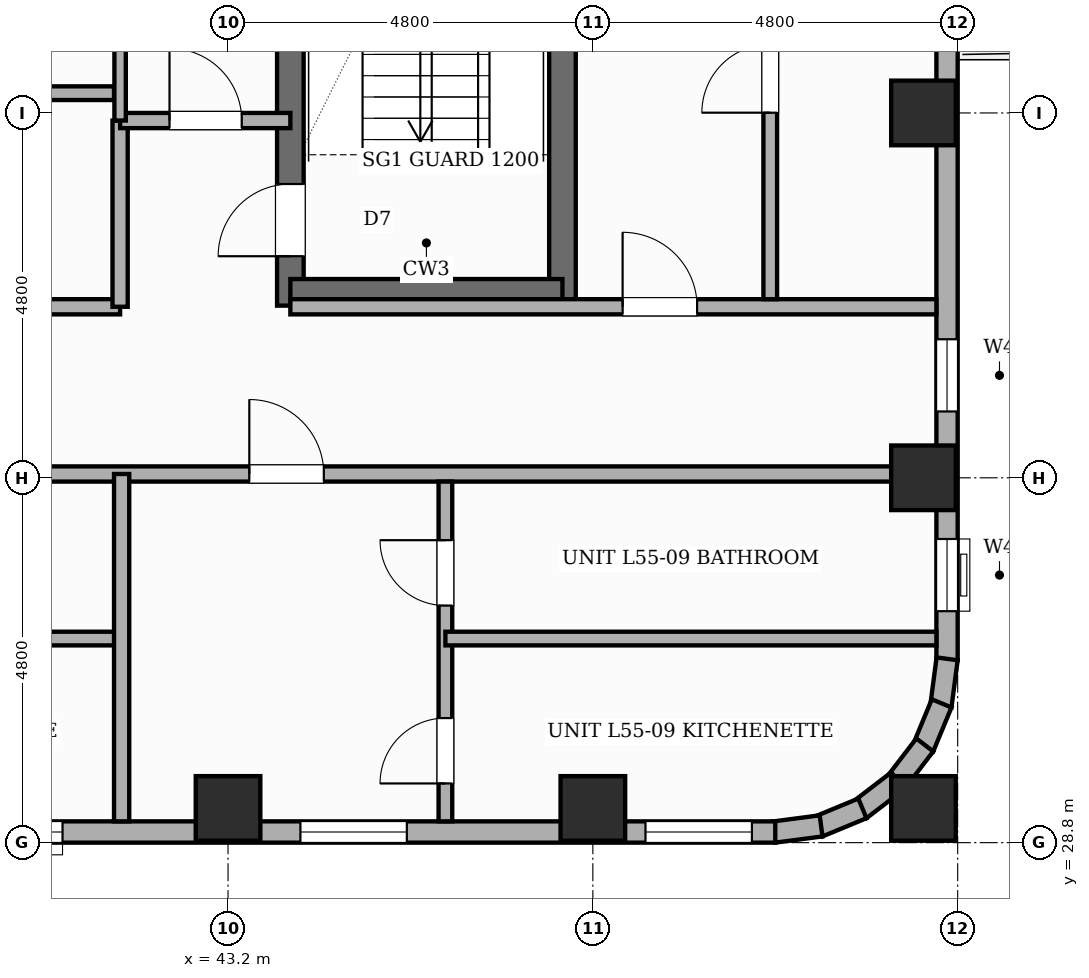
"""IFC4 building model, lengths in metres.
Left out: names, types, materials, properties, quantities, classifications, styles, units other than length and angle.
Written with IfcOpenShell. Run it as: python <this file> out.ifc"""

import sys

from ifc_helpers import new_model, si_unit, direction, frame, frame_2d, origin, origin_2d, place, context, subcontext, project, spatial, rectangle, extrude, element, fill, save


model = new_model("IFC4")
c1 = context("Model", 3, precision=1e-05, world=origin(), true_north=direction((0.0, 1.0)))
c2 = subcontext(c1, "Body", "Model", "MODEL_VIEW")
j1 = project(units=[si_unit("LENGTHUNIT", "METRE"), si_unit("PLANEANGLEUNIT", "RADIAN")], contexts=[c1])
p1 = place(None, origin())
s1 = spatial("IfcSite", under=j1, at=p1, CompositionType="ELEMENT")
p2 = place(p1, origin())
s2 = spatial("IfcBuilding", under=s1, at=p2, CompositionType="ELEMENT")
p3 = place(p2, frame((0.0, 0.0, 211.0)))
s3 = spatial("IfcBuildingStorey", under=s2, at=p3, CompositionType="ELEMENT", Elevation=211.0)
p4 = place(p3, frame((44.02, 35.865, 0.0), z_axis=(0.0, 0.0, 1.0), x_axis=(0.0, 1.0, 0.0)))
e1 = element("IfcWall", 1, at=p4, inside=s3, PredefinedType="SHEAR", context=c2, shape_type="SweptSolid", body=[
    extrude(rectangle(XDim=8.97, YDim=0.35, at=frame_2d((4.485, 0.0))), origin(), (0.0, 0.0, 1.0), 3.6),
])
p5 = place(p4, frame((0.65, 0.0, 0.0)))
e2 = element("IfcOpeningElement", 2, at=p5, cuts=e1, PredefinedType="OPENING", context=c2, shape_type="SweptSolid", body=[
    extrude(rectangle(XDim=0.95, YDim=2.1, at=frame_2d((0.475, 1.05))), frame((0.0, 0.185, 0.0), z_axis=(0.0, -1.0, 0.0), x_axis=(1.0, 0.0, 0.0)), (0.0, 0.0, 1.0), 0.37),
])
p6 = place(p3, frame((47.6, 35.865, 0.0), z_axis=(0.0, 0.0, 1.0), x_axis=(0.0, 1.0, 0.0)))
e3 = element("IfcWall", 3, at=p6, inside=s3, PredefinedType="SHEAR", context=c2, shape_type="SweptSolid", body=[
    extrude(rectangle(XDim=8.97, YDim=0.35, at=frame_2d((4.485, 0.0))), origin(), (0.0, 0.0, 1.0), 3.6),
])
p7 = place(p3, frame((44.02, 36.04, 0.0), z_axis=(0.0, 0.0, 1.0), x_axis=(1.0, 0.0, 0.0)))
e4 = element("IfcWall", 4, at=p7, inside=s3, PredefinedType="SHEAR", context=c2, shape_type="SweptSolid", body=[
    extrude(rectangle(XDim=3.58, YDim=0.35, at=frame_2d((1.79, 0.0))), origin(), (0.0, 0.0, 1.0), 3.6),
])
for number, where, z_axis, x_axis in (
    (5, (43.2, 29.25, 0.0), (0.0, 0.0, 1.0), (1.0, 0.0, 0.0)),
    (6, (48.0, 29.25, 0.0), (0.0, 0.0, 1.0), (1.0, 0.0, 0.0)),
    (7, (52.35, 29.25, 0.0), (0.0, 0.0, 1.0), (1.0, 0.0, 0.0)),
    (8, (52.35, 33.6, 0.0), (0.0, 0.0, 1.0), (1.0, 0.0, 0.0)),
    (9, (52.35, 38.4, 0.0), (0.0, 0.0, 1.0), (1.0, 0.0, 0.0)),
):
    element("IfcColumn", number, at=place(p3, frame(where, z_axis=z_axis, x_axis=x_axis)), inside=s3, PredefinedType="COLUMN", context=c2, shape_type="SweptSolid", body=[
        extrude(rectangle(XDim=0.85, YDim=0.85, at=origin_2d()), origin(), (0.0, 0.0, 1.0), 3.6),
    ])
p8 = place(p3, frame((52.66, 45.6, 0.0), z_axis=(0.0, 0.0, 1.0), x_axis=(0.0, -1.0, 0.0)))
e10 = element("IfcWall", 10, at=p8, inside=s3, PredefinedType="STANDARD", context=c2, shape_type="SweptSolid", body=[
    extrude(rectangle(XDim=14.4, YDim=0.28, at=frame_2d((7.2, 0.0))), origin(), (0.0, 0.0, 1.0), 2.66),
])
p9 = place(p8, frame((4.25, 0.0, 0.0)))
e11 = element("IfcOpeningElement", 11, at=p9, cuts=e10, PredefinedType="OPENING", context=c2, shape_type="SweptSolid", body=[
    extrude(rectangle(XDim=1.1, YDim=2.15, at=frame_2d((0.55, 1.075))), frame((0.0, 0.15, 0.0), z_axis=(0.0, -1.0, 0.0), x_axis=(1.0, 0.0, 0.0)), (0.0, 0.0, 1.0), 0.3),
])
p10 = place(p8, frame((10.177, 0.0, 0.45)))
e12 = element("IfcOpeningElement", 12, at=p10, cuts=e10, PredefinedType="OPENING", context=c2, shape_type="SweptSolid", body=[
    extrude(rectangle(XDim=0.95, YDim=1.8, at=frame_2d((0.475, 0.9))), frame((0.0, 0.15, 0.0), z_axis=(0.0, -1.0, 0.0), x_axis=(1.0, 0.0, 0.0)), (0.0, 0.0, 1.0), 0.3),
])
p11 = place(p8, frame((12.805, 0.0, 0.45)))
e13 = element("IfcOpeningElement", 13, at=p11, cuts=e10, PredefinedType="OPENING", context=c2, shape_type="SweptSolid", body=[
    extrude(rectangle(XDim=0.95, YDim=1.8, at=frame_2d((0.475, 0.9))), frame((0.0, 0.15, 0.0), z_axis=(0.0, -1.0, 0.0), x_axis=(1.0, 0.0, 0.0)), (0.0, 0.0, 1.0), 0.3),
])
p12 = place(p8, frame((0.308, 0.0, 0.65)))
e14 = element("IfcOpeningElement", 14, at=p12, cuts=e10, PredefinedType="OPENING", context=c2, shape_type="SweptSolid", body=[
    extrude(rectangle(XDim=1.4, YDim=1.1, at=frame_2d((0.7, 0.55))), frame((0.0, 0.15, 0.0), z_axis=(0.0, -1.0, 0.0), x_axis=(1.0, 0.0, 0.0)), (0.0, 0.0, 1.0), 0.3),
])
p13 = place(p8, frame((3.299, 0.0, 0.45)))
e15 = element("IfcOpeningElement", 15, at=p13, cuts=e10, PredefinedType="OPENING", context=c2, shape_type="SweptSolid", body=[
    extrude(rectangle(XDim=0.6, YDim=1.8, at=frame_2d((0.3, 0.9))), frame((0.0, 0.15, 0.0), z_axis=(0.0, -1.0, 0.0), x_axis=(1.0, 0.0, 0.0)), (0.0, 0.0, 1.0), 0.3),
])
p14 = place(p3, frame((52.661, 31.218, 0.0), z_axis=(0.0, 0.0, 1.0), x_axis=(-0.130555323746, -0.9914410257, 0.0)))
e16 = element("IfcWall", 16, at=p14, inside=s3, PredefinedType="STANDARD", context=c2, shape_type="SweptSolid", body=[
    extrude(rectangle(XDim=0.626, YDim=0.28, at=frame_2d((0.313, 0.0))), origin(), (0.0, 0.0, 1.0), 2.66),
])
p15 = place(p3, frame((52.589, 30.632, 0.0), z_axis=(0.0, 0.0, 1.0), x_axis=(-0.382787856107, -0.923836271867, 0.0)))
e17 = element("IfcWall", 17, at=p15, inside=s3, PredefinedType="STANDARD", context=c2, shape_type="SweptSolid", body=[
    extrude(rectangle(XDim=0.626, YDim=0.28, at=frame_2d((0.313, 0.0))), origin(), (0.0, 0.0, 1.0), 2.66),
])
for number, where, z_axis, x_axis in (
    (18, (52.367, 30.085, 0.0), (0.0, 0.0, 1.0), (-0.609, -0.793, 0.0)),
    (19, (52.012, 29.614, 0.0), (0.0, 0.0, 1.0), (-0.793, -0.609, 0.0)),
    (20, (51.546, 29.251, 0.0), (0.0, 0.0, 1.0), (-0.924, -0.383, 0.0)),
):
    element("IfcWall", number, at=place(p3, frame(where, z_axis=z_axis, x_axis=x_axis)), inside=s3, PredefinedType="STANDARD", context=c2, shape_type="SweptSolid", body=[
        extrude(rectangle(XDim=0.626, YDim=0.28, at=frame_2d((0.313, 0.0))), origin(), (0.0, 0.0, 1.0), 2.66),
    ])
p16 = place(p3, frame((51.003, 29.021, 0.0), z_axis=(0.0, 0.0, 1.0), x_axis=(-0.991447664465, -0.130504898859, 0.0)))
e21 = element("IfcWall", 21, at=p16, inside=s3, PredefinedType="STANDARD", context=c2, shape_type="SweptSolid", body=[
    extrude(rectangle(XDim=0.627, YDim=0.28, at=frame_2d((0.313, 0.0))), origin(), (0.0, 0.0, 1.0), 2.66),
])
p17 = place(p3, frame((50.4, 28.94, 0.0), z_axis=(0.0, 0.0, 1.0), x_axis=(-1.0, 0.0, 0.0)))
e22 = element("IfcWall", 22, at=p17, inside=s3, PredefinedType="STANDARD", context=c2, shape_type="SweptSolid", body=[
    extrude(rectangle(XDim=24.0, YDim=0.28, at=frame_2d((12.0, 0.0))), origin(), (0.0, 0.0, 1.0), 2.66),
])
p18 = place(p17, frame((19.177, 0.0, 0.65)))
e23 = element("IfcOpeningElement", 23, at=p18, cuts=e22, PredefinedType="OPENING", context=c2, shape_type="SweptSolid", body=[
    extrude(rectangle(XDim=1.4, YDim=1.1, at=frame_2d((0.7, 0.55))), frame((0.0, 0.15, 0.0), z_axis=(0.0, -1.0, 0.0), x_axis=(1.0, 0.0, 0.0)), (0.0, 0.0, 1.0), 0.3),
])
p19 = place(p17, frame((14.481, 0.0, 0.65)))
e24 = element("IfcOpeningElement", 24, at=p19, cuts=e22, PredefinedType="OPENING", context=c2, shape_type="SweptSolid", body=[
    extrude(rectangle(XDim=1.4, YDim=1.1, at=frame_2d((0.7, 0.55))), frame((0.0, 0.15, 0.0), z_axis=(0.0, -1.0, 0.0), x_axis=(1.0, 0.0, 0.0)), (0.0, 0.0, 1.0), 0.3),
])
p20 = place(p17, frame((4.847, 0.0, 0.65)))
e25 = element("IfcOpeningElement", 25, at=p20, cuts=e22, PredefinedType="OPENING", context=c2, shape_type="SweptSolid", body=[
    extrude(rectangle(XDim=1.4, YDim=1.1, at=frame_2d((0.7, 0.55))), frame((0.0, 0.15, 0.0), z_axis=(0.0, -1.0, 0.0), x_axis=(1.0, 0.0, 0.0)), (0.0, 0.0, 1.0), 0.3),
])
p21 = place(p17, frame((9.377, 0.0, 0.65)))
e26 = element("IfcOpeningElement", 26, at=p21, cuts=e22, PredefinedType="OPENING", context=c2, shape_type="SweptSolid", body=[
    extrude(rectangle(XDim=1.4, YDim=1.1, at=frame_2d((0.7, 0.55))), frame((0.0, 0.15, 0.0), z_axis=(0.0, -1.0, 0.0), x_axis=(1.0, 0.0, 0.0)), (0.0, 0.0, 1.0), 0.3),
])
p22 = place(p17, frame((0.308, 0.0, 0.65)))
e27 = element("IfcOpeningElement", 27, at=p22, cuts=e22, PredefinedType="OPENING", context=c2, shape_type="SweptSolid", body=[
    extrude(rectangle(XDim=1.4, YDim=1.1, at=frame_2d((0.7, 0.55))), frame((0.0, 0.15, 0.0), z_axis=(0.0, -1.0, 0.0), x_axis=(1.0, 0.0, 0.0)), (0.0, 0.0, 1.0), 0.3),
])
p23 = place(p3, frame((22.75, 33.65, 0.0), z_axis=(0.0, 0.0, 1.0), x_axis=(1.0, 0.0, 0.0)))
e28 = element("IfcWall", 28, at=p23, inside=s3, PredefinedType="PARTITIONING", context=c2, shape_type="SweptSolid", body=[
    extrude(rectangle(XDim=29.77, YDim=0.2, at=frame_2d((14.885, 0.0))), origin(), (0.0, 0.0, 1.0), 3.38),
])
p24 = place(p23, frame((5.995, 0.0, 0.0)))
e29 = element("IfcOpeningElement", 29, at=p24, cuts=e28, PredefinedType="OPENING", context=c2, shape_type="SweptSolid", body=[
    extrude(rectangle(XDim=0.98, YDim=2.18, at=frame_2d((0.49, 1.09))), frame((0.0, 0.11, 0.0), z_axis=(0.0, -1.0, 0.0), x_axis=(1.0, 0.0, 0.0)), (0.0, 0.0, 1.0), 0.22),
])
p25 = place(p23, frame((10.896, 0.0, 0.0)))
e30 = element("IfcOpeningElement", 30, at=p25, cuts=e28, PredefinedType="OPENING", context=c2, shape_type="SweptSolid", body=[
    extrude(rectangle(XDim=0.98, YDim=2.18, at=frame_2d((0.49, 1.09))), frame((0.0, 0.11, 0.0), z_axis=(0.0, -1.0, 0.0), x_axis=(1.0, 0.0, 0.0)), (0.0, 0.0, 1.0), 0.22),
])
p26 = place(p23, frame((20.73, 0.0, 0.0)))
e31 = element("IfcOpeningElement", 31, at=p26, cuts=e28, PredefinedType="OPENING", context=c2, shape_type="SweptSolid", body=[
    extrude(rectangle(XDim=0.98, YDim=2.18, at=frame_2d((0.49, 1.09))), frame((0.0, 0.11, 0.0), z_axis=(0.0, -1.0, 0.0), x_axis=(1.0, 0.0, 0.0)), (0.0, 0.0, 1.0), 0.22),
])
p27 = place(p3, frame((27.35, 35.85, 0.0), z_axis=(0.0, 0.0, 1.0), x_axis=(1.0, 0.0, 0.0)))
e32 = element("IfcWall", 32, at=p27, inside=s3, PredefinedType="PARTITIONING", context=c2, shape_type="SweptSolid", body=[
    extrude(rectangle(XDim=14.43, YDim=0.2, at=frame_2d((7.215, 0.0))), origin(), (0.0, 0.0, 1.0), 3.38),
])
p28 = place(p27, frame((4.803, 0.0, 0.0)))
e33 = element("IfcOpeningElement", 33, at=p28, cuts=e32, PredefinedType="OPENING", context=c2, shape_type="SweptSolid", body=[
    extrude(rectangle(XDim=0.98, YDim=2.18, at=frame_2d((0.49, 1.09))), frame((0.0, 0.11, 0.0), z_axis=(0.0, -1.0, 0.0), x_axis=(1.0, 0.0, 0.0)), (0.0, 0.0, 1.0), 0.22),
])
p29 = place(p3, frame((44.02, 35.85, 0.0), z_axis=(0.0, 0.0, 1.0), x_axis=(1.0, 0.0, 0.0)))
e34 = element("IfcWall", 34, at=p29, inside=s3, PredefinedType="PARTITIONING", context=c2, shape_type="SweptSolid", body=[
    extrude(rectangle(XDim=8.5, YDim=0.2, at=frame_2d((4.25, 0.0))), origin(), (0.0, 0.0, 1.0), 3.38),
])
p30 = place(p29, frame((4.372, 0.0, 0.0)))
e35 = element("IfcOpeningElement", 35, at=p30, cuts=e34, PredefinedType="OPENING", context=c2, shape_type="SweptSolid", body=[
    extrude(rectangle(XDim=0.98, YDim=2.18, at=frame_2d((0.49, 1.09))), frame((0.0, 0.11, 0.0), z_axis=(0.0, -1.0, 0.0), x_axis=(1.0, 0.0, 0.0)), (0.0, 0.0, 1.0), 0.22),
])
p31 = place(p3, frame((41.78, 35.85, 0.0), z_axis=(0.0, 0.0, 1.0), x_axis=(0.0, 1.0, 0.0)))
e36 = element("IfcWall", 36, at=p31, inside=s3, PredefinedType="PARTITIONING", context=c2, shape_type="SweptSolid", body=[
    extrude(rectangle(XDim=2.45, YDim=0.2, at=frame_2d((1.225, 0.0))), origin(), (0.0, 0.0, 1.0), 3.38),
])
p32 = place(p3, frame((41.78, 38.3, 0.0), z_axis=(0.0, 0.0, 1.0), x_axis=(1.0, 0.0, 0.0)))
e37 = element("IfcWall", 37, at=p32, inside=s3, PredefinedType="PARTITIONING", context=c2, shape_type="SweptSolid", body=[
    extrude(rectangle(XDim=2.24, YDim=0.2, at=frame_2d((1.12, 0.0))), origin(), (0.0, 0.0, 1.0), 3.38),
])
p33 = place(p32, frame((0.65, 0.0, 0.0)))
e38 = element("IfcOpeningElement", 38, at=p33, cuts=e37, PredefinedType="OPENING", context=c2, shape_type="SweptSolid", body=[
    extrude(rectangle(XDim=0.95, YDim=2.15, at=frame_2d((0.475, 1.075))), frame((0.0, 0.11, 0.0), z_axis=(0.0, -1.0, 0.0), x_axis=(1.0, 0.0, 0.0)), (0.0, 0.0, 1.0), 0.22),
])
p34 = place(p3, frame((36.392, 31.485, 0.0), z_axis=(0.0, 0.0, 1.0), x_axis=(1.0, 0.0, 0.0)))
e39 = element("IfcWall", 39, at=p34, inside=s3, PredefinedType="PLUMBINGWALL", context=c2, shape_type="SweptSolid", body=[
    extrude(rectangle(XDim=5.408, YDim=0.18, at=frame_2d((2.704, 0.0))), origin(), (0.0, 0.0, 1.0), 3.38),
])
p35 = place(p3, frame((41.8, 29.08, 0.0), z_axis=(0.0, 0.0, 1.0), x_axis=(0.0, 1.0, 0.0)))
e40 = element("IfcWall", 40, at=p35, inside=s3, PredefinedType="SOLIDWALL", context=c2, shape_type="SweptSolid", body=[
    extrude(rectangle(XDim=4.57, YDim=0.2, at=frame_2d((2.285, 0.0))), origin(), (0.0, 0.0, 1.0), 3.38),
])
p36 = place(p3, frame((46.06, 29.08, 0.0), z_axis=(0.0, 0.0, 1.0), x_axis=(0.0, 1.0, 0.0)))
e41 = element("IfcWall", 41, at=p36, inside=s3, PredefinedType="PLUMBINGWALL", context=c2, shape_type="SweptSolid", body=[
    extrude(rectangle(XDim=4.47, YDim=0.18, at=frame_2d((2.235, 0.0))), origin(), (0.0, 0.0, 1.0), 3.38),
])
p37 = place(p36, frame((0.499, 0.0, 0.0)))
e42 = element("IfcOpeningElement", 42, at=p37, cuts=e41, PredefinedType="OPENING", context=c2, shape_type="SweptSolid", body=[
    extrude(rectangle(XDim=0.86, YDim=2.1, at=frame_2d((0.43, 1.05))), frame((0.0, 0.1, 0.0), z_axis=(0.0, -1.0, 0.0), x_axis=(1.0, 0.0, 0.0)), (0.0, 0.0, 1.0), 0.2),
])
p38 = place(p36, frame((2.839, 0.0, 0.0)))
e43 = element("IfcOpeningElement", 43, at=p38, cuts=e41, PredefinedType="OPENING", context=c2, shape_type="SweptSolid", body=[
    extrude(rectangle(XDim=0.86, YDim=2.1, at=frame_2d((0.43, 1.05))), frame((0.0, 0.1, 0.0), z_axis=(0.0, -1.0, 0.0), x_axis=(1.0, 0.0, 0.0)), (0.0, 0.0, 1.0), 0.2),
])
p39 = place(p3, frame((46.06, 31.485, 0.0), z_axis=(0.0, 0.0, 1.0), x_axis=(1.0, 0.0, 0.0)))
e44 = element("IfcWall", 44, at=p39, inside=s3, PredefinedType="PLUMBINGWALL", context=c2, shape_type="SweptSolid", body=[
    extrude(rectangle(XDim=6.46, YDim=0.18, at=frame_2d((3.23, 0.0))), origin(), (0.0, 0.0, 1.0), 3.38),
])
p40 = place(p3, frame((35.577, 38.66, 0.0), z_axis=(0.0, 0.0, 1.0), x_axis=(1.0, 0.0, 0.0)))
e45 = element("IfcWall", 45, at=p40, inside=s3, PredefinedType="PLUMBINGWALL", context=c2, shape_type="SweptSolid", body=[
    extrude(rectangle(XDim=6.123, YDim=0.18, at=frame_2d((3.062, 0.0))), origin(), (0.0, 0.0, 1.0), 3.38),
])
p41 = place(p3, frame((41.78, 38.3, 0.0), z_axis=(0.0, 0.0, 1.0), x_axis=(0.0, 1.0, 0.0)))
e46 = element("IfcWall", 46, at=p41, inside=s3, PredefinedType="PARTITIONING", context=c2, shape_type="SweptSolid", body=[
    extrude(rectangle(XDim=9.42, YDim=0.15, at=frame_2d((4.71, 0.0))), origin(), (0.0, 0.0, 1.0), 3.38),
])
p42 = place(p3, frame((50.334, 35.95, 0.0), z_axis=(0.0, 0.0, 1.0), x_axis=(0.0, 1.0, 0.0)))
e47 = element("IfcWall", 47, at=p42, inside=s3, PredefinedType="PLUMBINGWALL", context=c2, shape_type="SweptSolid", body=[
    extrude(rectangle(XDim=11.77, YDim=0.18, at=frame_2d((5.885, 0.0))), origin(), (0.0, 0.0, 1.0), 3.38),
])
p43 = place(p42, frame((2.453, 0.0, 0.0)))
e48 = element("IfcOpeningElement", 48, at=p43, cuts=e47, PredefinedType="OPENING", context=c2, shape_type="SweptSolid", body=[
    extrude(rectangle(XDim=0.9, YDim=2.15, at=frame_2d((0.45, 1.075))), frame((0.0, 0.1, 0.0), z_axis=(0.0, -1.0, 0.0), x_axis=(1.0, 0.0, 0.0)), (0.0, 0.0, 1.0), 0.2),
])
p44 = place(p42, frame((8.487, 0.0, 0.0)))
e49 = element("IfcOpeningElement", 49, at=p44, cuts=e47, PredefinedType="OPENING", context=c2, shape_type="SweptSolid", body=[
    extrude(rectangle(XDim=0.86, YDim=2.1, at=frame_2d((0.43, 1.05))), frame((0.0, 0.1, 0.0), z_axis=(0.0, -1.0, 0.0), x_axis=(1.0, 0.0, 0.0)), (0.0, 0.0, 1.0), 0.2),
])
p45 = place(p10, origin())
e50 = element("IfcWindow", 50, at=p45, inside=s3, PartitioningType="SINGLE_PANEL", PredefinedType="WINDOW", context=c2, shape_type="SweptSolid", body=[
    extrude(rectangle(XDim=0.95, YDim=1.8, at=frame_2d((0.475, 0.9))), frame((0.0, 0.03, 0.0), z_axis=(0.0, -1.0, 0.0), x_axis=(1.0, 0.0, 0.0)), (0.0, 0.0, 1.0), 0.06),
])
fill(e12, e50)
p46 = place(p11, origin())
e51 = element("IfcWindow", 51, at=p46, inside=s3, PartitioningType="SINGLE_PANEL", PredefinedType="WINDOW", context=c2, shape_type="SweptSolid", body=[
    extrude(rectangle(XDim=0.95, YDim=1.8, at=frame_2d((0.475, 0.9))), frame((0.0, 0.03, 0.0), z_axis=(0.0, -1.0, 0.0), x_axis=(1.0, 0.0, 0.0)), (0.0, 0.0, 1.0), 0.06),
])
fill(e13, e51)
p47 = place(p20, origin())
e52 = element("IfcWindow", 52, at=p47, inside=s3, PartitioningType="SINGLE_PANEL", PredefinedType="WINDOW", context=c2, shape_type="SweptSolid", body=[
    extrude(rectangle(XDim=1.4, YDim=1.1, at=frame_2d((0.7, 0.55))), frame((0.0, 0.03, 0.0), z_axis=(0.0, -1.0, 0.0), x_axis=(1.0, 0.0, 0.0)), (0.0, 0.0, 1.0), 0.06),
])
fill(e25, e52)
p48 = place(p21, origin())
e53 = element("IfcWindow", 53, at=p48, inside=s3, PartitioningType="SINGLE_PANEL", PredefinedType="WINDOW", context=c2, shape_type="SweptSolid", body=[
    extrude(rectangle(XDim=1.4, YDim=1.1, at=frame_2d((0.7, 0.55))), frame((0.0, 0.03, 0.0), z_axis=(0.0, -1.0, 0.0), x_axis=(1.0, 0.0, 0.0)), (0.0, 0.0, 1.0), 0.06),
])
fill(e26, e53)
p49 = place(p22, origin())
e54 = element("IfcWindow", 54, at=p49, inside=s3, PartitioningType="SINGLE_PANEL", PredefinedType="WINDOW", context=c2, shape_type="SweptSolid", body=[
    extrude(rectangle(XDim=1.4, YDim=1.1, at=frame_2d((0.7, 0.55))), frame((0.0, 0.03, 0.0), z_axis=(0.0, -1.0, 0.0), x_axis=(1.0, 0.0, 0.0)), (0.0, 0.0, 1.0), 0.06),
])
fill(e27, e54)
p50 = place(p5, origin())
e55 = element("IfcDoor", 55, at=p50, inside=s3, OperationType="SINGLE_SWING_LEFT", PredefinedType="DOOR", context=c2, shape_type="SweptSolid", body=[
    extrude(rectangle(XDim=0.95, YDim=2.1, at=frame_2d((0.475, 1.05))), frame((0.0, 0.025, 0.0), z_axis=(0.0, -1.0, 0.0), x_axis=(1.0, 0.0, 0.0)), (0.0, 0.0, 1.0), 0.05),
])
fill(e2, e55)
p51 = place(p26, origin())
e56 = element("IfcDoor", 56, at=p51, inside=s3, OperationType="SINGLE_SWING_LEFT", PredefinedType="DOOR", context=c2, shape_type="SweptSolid", body=[
    extrude(rectangle(XDim=0.98, YDim=2.18, at=frame_2d((0.49, 1.09))), frame((0.0, 0.025, 0.0), z_axis=(0.0, -1.0, 0.0), x_axis=(1.0, 0.0, 0.0)), (0.0, 0.0, 1.0), 0.05),
])
fill(e31, e56)
p52 = place(p37, origin())
e57 = element("IfcDoor", 57, at=p52, inside=s3, OperationType="SINGLE_SWING_LEFT", PredefinedType="DOOR", context=c2, shape_type="SweptSolid", body=[
    extrude(rectangle(XDim=0.86, YDim=2.1, at=frame_2d((0.43, 1.05))), frame((0.0, 0.025, 0.0), z_axis=(0.0, -1.0, 0.0), x_axis=(1.0, 0.0, 0.0)), (0.0, 0.0, 1.0), 0.05),
])
fill(e42, e57)
p53 = place(p38, origin())
e58 = element("IfcDoor", 58, at=p53, inside=s3, OperationType="SINGLE_SWING_RIGHT", PredefinedType="DOOR", context=c2, shape_type="SweptSolid", body=[
    extrude(rectangle(XDim=0.86, YDim=2.1, at=frame_2d((0.43, 1.05))), frame((0.0, 0.025, 0.0), z_axis=(0.0, -1.0, 0.0), x_axis=(1.0, 0.0, 0.0)), (0.0, 0.0, 1.0), 0.05),
])
fill(e43, e58)
p54 = place(p33, origin())
e59 = element("IfcDoor", 59, at=p54, inside=s3, OperationType="SINGLE_SWING_LEFT", PredefinedType="DOOR", context=c2, shape_type="SweptSolid", body=[
    extrude(rectangle(XDim=0.95, YDim=2.15, at=frame_2d((0.475, 1.075))), frame((0.0, 0.025, 0.0), z_axis=(0.0, -1.0, 0.0), x_axis=(1.0, 0.0, 0.0)), (0.0, 0.0, 1.0), 0.05),
])
fill(e38, e59)
p55 = place(p30, origin())
e60 = element("IfcDoor", 60, at=p55, inside=s3, OperationType="SINGLE_SWING_LEFT", PredefinedType="DOOR", context=c2, shape_type="SweptSolid", body=[
    extrude(rectangle(XDim=0.98, YDim=2.18, at=frame_2d((0.49, 1.09))), frame((0.0, 0.025, 0.0), z_axis=(0.0, -1.0, 0.0), x_axis=(1.0, 0.0, 0.0)), (0.0, 0.0, 1.0), 0.05),
])
fill(e35, e60)
p56 = place(p43, origin())
e61 = element("IfcDoor", 61, at=p56, inside=s3, OperationType="SINGLE_SWING_LEFT", PredefinedType="DOOR", context=c2, shape_type="SweptSolid", body=[
    extrude(rectangle(XDim=0.9, YDim=2.15, at=frame_2d((0.45, 1.075))), frame((0.0, 0.025, 0.0), z_axis=(0.0, -1.0, 0.0), x_axis=(1.0, 0.0, 0.0)), (0.0, 0.0, 1.0), 0.05),
])
fill(e48, e61)
save(model, sys.argv[1])
